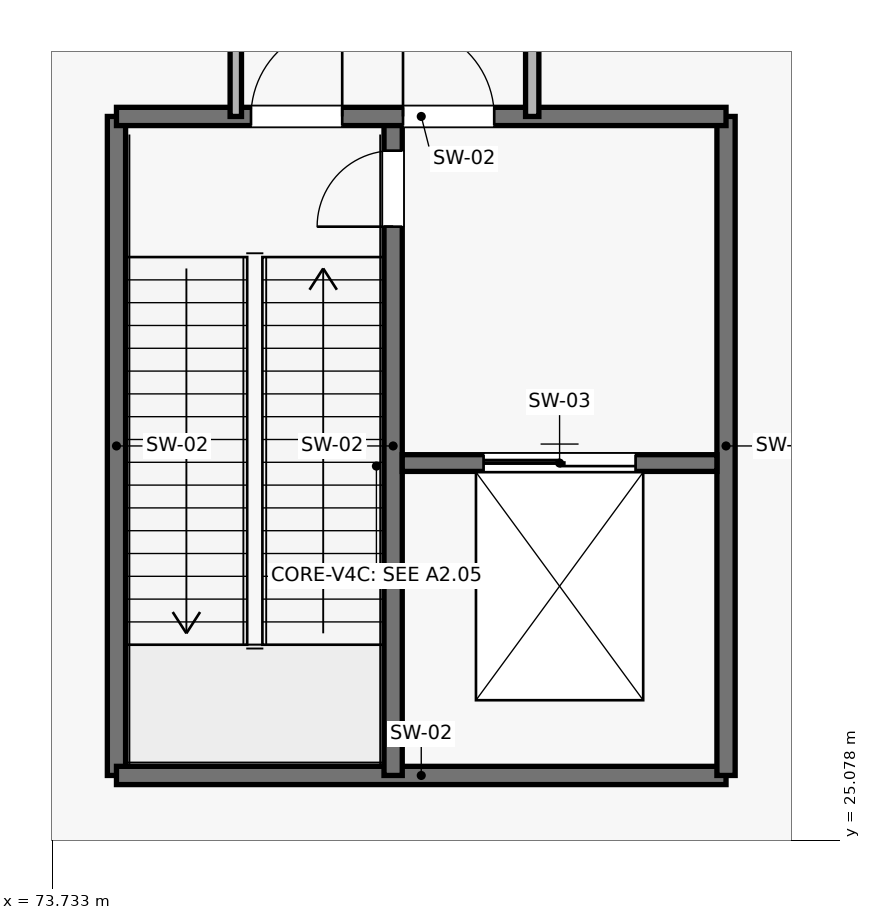
"""IFC4 building model, lengths in metres.
Left out: names, types, materials, properties, quantities, classifications, styles, units other than length and angle.
Written with IfcOpenShell. Run it as: python <this file> out.ifc"""

import sys

from ifc_helpers import new_model, si_unit, direction, frame, frame_2d, origin, place, context, subcontext, project, spatial, rectangle, extrude, element, fill, save


model = new_model("IFC4")
c1 = context("Model", 3, precision=1e-05, world=origin(), true_north=direction((0.0, 1.0)))
c2 = subcontext(c1, "Body", "Model", "MODEL_VIEW")
j1 = project(units=[si_unit("LENGTHUNIT", "METRE"), si_unit("PLANEANGLEUNIT", "RADIAN")], contexts=[c1])
p1 = place(None, origin())
s1 = spatial("IfcSite", under=j1, at=p1, CompositionType="ELEMENT")
p2 = place(p1, origin())
s2 = spatial("IfcBuilding", under=s1, at=p2, CompositionType="ELEMENT")
p3 = place(p2, origin())
s3 = spatial("IfcBuildingStorey", under=s2, at=p3, CompositionType="ELEMENT", Elevation=0.0)
p4 = place(p3, frame((74.58, 34.6, 0.0), z_axis=(0.0, 0.0, 1.0), x_axis=(0.0, -1.0, 0.0)))
e1 = element("IfcWall", 1, at=p4, inside=s3, PredefinedType="SHEAR", context=c2, shape_type="SweptSolid", body=[
    extrude(rectangle(XDim=8.67, YDim=0.24, at=frame_2d((4.335, 0.0))), origin(), (0.0, 0.0, 1.0), 6.25),
])
p5 = place(p3, frame((74.58, 25.93, 0.0), z_axis=(0.0, 0.0, 1.0), x_axis=(1.0, 0.0, 0.0)))
e2 = element("IfcWall", 2, at=p5, inside=s3, PredefinedType="SHEAR", context=c2, shape_type="SweptSolid", body=[
    extrude(rectangle(XDim=8.02, YDim=0.24, at=frame_2d((4.01, 0.0))), origin(), (0.0, 0.0, 1.0), 6.25),
])
p6 = place(p3, frame((78.22, 25.93, 0.0), z_axis=(0.0, 0.0, 1.0), x_axis=(0.0, 1.0, 0.0)))
e3 = element("IfcWall", 3, at=p6, inside=s3, PredefinedType="SHEAR", context=c2, shape_type="SweptSolid", body=[
    extrude(rectangle(XDim=8.67, YDim=0.24, at=frame_2d((4.335, 0.0))), origin(), (0.0, 0.0, 1.0), 6.25),
])
p7 = place(p6, frame((7.22, 0.0, 0.0)))
e4 = element("IfcOpeningElement", 4, at=p7, cuts=e3, PredefinedType="OPENING", context=c2, shape_type="SweptSolid", body=[
    extrude(rectangle(XDim=1.0, YDim=2.2, at=frame_2d((0.5, 1.1))), frame((0.0, 0.135, 0.0), z_axis=(0.0, -1.0, 0.0), x_axis=(1.0, 0.0, 0.0)), (0.0, 0.0, 1.0), 0.27),
])
p8 = place(p3, frame((82.6, 25.93, 0.0), z_axis=(0.0, 0.0, 1.0), x_axis=(0.0, 1.0, 0.0)))
e5 = element("IfcWall", 5, at=p8, inside=s3, PredefinedType="SHEAR", context=c2, shape_type="SweptSolid", body=[
    extrude(rectangle(XDim=8.67, YDim=0.24, at=frame_2d((4.335, 0.0))), origin(), (0.0, 0.0, 1.0), 6.25),
])
p9 = place(p3, frame((74.58, 34.6, 0.0), z_axis=(0.0, 0.0, 1.0), x_axis=(1.0, 0.0, 0.0)))
e6 = element("IfcWall", 6, at=p9, inside=s3, PredefinedType="SHEAR", context=c2, shape_type="SweptSolid", body=[
    extrude(rectangle(XDim=8.02, YDim=0.24, at=frame_2d((4.01, 0.0))), origin(), (0.0, 0.0, 1.0), 6.25),
])
p10 = place(p9, frame((1.77, 0.0, 0.0)))
e7 = element("IfcOpeningElement", 7, at=p10, cuts=e6, PredefinedType="OPENING", context=c2, shape_type="SweptSolid", body=[
    extrude(rectangle(XDim=1.2, YDim=2.2, at=frame_2d((0.6, 1.1))), frame((0.0, 0.135, 0.0), z_axis=(0.0, -1.0, 0.0), x_axis=(1.0, 0.0, 0.0)), (0.0, 0.0, 1.0), 0.27),
])
p11 = place(p9, frame((3.77, 0.0, 0.0)))
e8 = element("IfcOpeningElement", 8, at=p11, cuts=e6, PredefinedType="OPENING", context=c2, shape_type="SweptSolid", body=[
    extrude(rectangle(XDim=1.2, YDim=2.2, at=frame_2d((0.6, 1.1))), frame((0.0, 0.135, 0.0), z_axis=(0.0, -1.0, 0.0), x_axis=(1.0, 0.0, 0.0)), (0.0, 0.0, 1.0), 0.27),
])
p12 = place(p3, frame((78.34, 30.04, 0.0), z_axis=(0.0, 0.0, 1.0), x_axis=(1.0, 0.0, 0.0)))
e9 = element("IfcWall", 9, at=p12, inside=s3, PredefinedType="SHEAR", context=c2, shape_type="SweptSolid", body=[
    extrude(rectangle(XDim=4.14, YDim=0.22, at=frame_2d((2.07, 0.0))), origin(), (0.0, 0.0, 1.0), 6.25),
])
p13 = place(p12, frame((1.07, 0.0, 0.0)))
e10 = element("IfcOpeningElement", 10, at=p13, cuts=e9, PredefinedType="OPENING", context=c2, shape_type="SweptSolid", body=[
    extrude(rectangle(XDim=2.0, YDim=2.4, at=frame_2d((1.0, 1.2))), frame((0.0, 0.125, 0.0), z_axis=(0.0, -1.0, 0.0), x_axis=(1.0, 0.0, 0.0)), (0.0, 0.0, 1.0), 0.25),
])
p14 = place(p3, frame((76.15, 34.6, 0.0), z_axis=(0.0, 0.0, 1.0), x_axis=(0.0, 1.0, 0.0)))
e11 = element("IfcWall", 11, at=p14, inside=s3, PredefinedType="PARTITIONING", context=c2, shape_type="SweptSolid", body=[
    extrude(rectangle(XDim=3.4, YDim=0.15, at=frame_2d((1.7, 0.0))), origin(), (0.0, 0.0, 1.0), 5.233),
])
p15 = place(p3, frame((80.05, 34.6, 0.0), z_axis=(0.0, 0.0, 1.0), x_axis=(0.0, 1.0, 0.0)))
e12 = element("IfcWall", 12, at=p15, inside=s3, PredefinedType="PARTITIONING", context=c2, shape_type="SweptSolid", body=[
    extrude(rectangle(XDim=3.4, YDim=0.175, at=frame_2d((1.7, 0.0))), origin(), (0.0, 0.0, 1.0), 5.233),
])
p16 = place(p10, origin())
e13 = element("IfcDoor", 13, at=p16, inside=s3, OperationType="SINGLE_SWING_RIGHT", PredefinedType="DOOR", context=c2, shape_type="SweptSolid", body=[
    extrude(rectangle(XDim=1.2, YDim=2.2, at=frame_2d((0.6, 1.1))), frame((0.0, 0.025, 0.0), z_axis=(0.0, -1.0, 0.0), x_axis=(1.0, 0.0, 0.0)), (0.0, 0.0, 1.0), 0.05),
])
fill(e7, e13)
p17 = place(p11, origin())
e14 = element("IfcDoor", 14, at=p17, inside=s3, OperationType="SINGLE_SWING_LEFT", PredefinedType="DOOR", context=c2, shape_type="SweptSolid", body=[
    extrude(rectangle(XDim=1.2, YDim=2.2, at=frame_2d((0.6, 1.1))), frame((0.0, 0.025, 0.0), z_axis=(0.0, -1.0, 0.0), x_axis=(1.0, 0.0, 0.0)), (0.0, 0.0, 1.0), 0.05),
])
fill(e8, e14)
p18 = place(p7, origin())
e15 = element("IfcDoor", 15, at=p18, inside=s3, OperationType="SINGLE_SWING_LEFT", PredefinedType="DOOR", context=c2, shape_type="SweptSolid", body=[
    extrude(rectangle(XDim=1.0, YDim=2.2, at=frame_2d((0.5, 1.1))), frame((0.0, 0.025, 0.0), z_axis=(0.0, -1.0, 0.0), x_axis=(1.0, 0.0, 0.0)), (0.0, 0.0, 1.0), 0.05),
])
fill(e4, e15)
p19 = place(p13, origin())
e16 = element("IfcDoor", 16, at=p19, inside=s3, OperationType="DOUBLE_DOOR_SLIDING", PredefinedType="DOOR", context=c2, shape_type="SweptSolid", body=[
    extrude(rectangle(XDim=2.0, YDim=2.4, at=frame_2d((1.0, 1.2))), frame((0.0, 0.025, 0.0), z_axis=(0.0, -1.0, 0.0), x_axis=(1.0, 0.0, 0.0)), (0.0, 0.0, 1.0), 0.05),
])
fill(e10, e16)
save(model, sys.argv[1])
